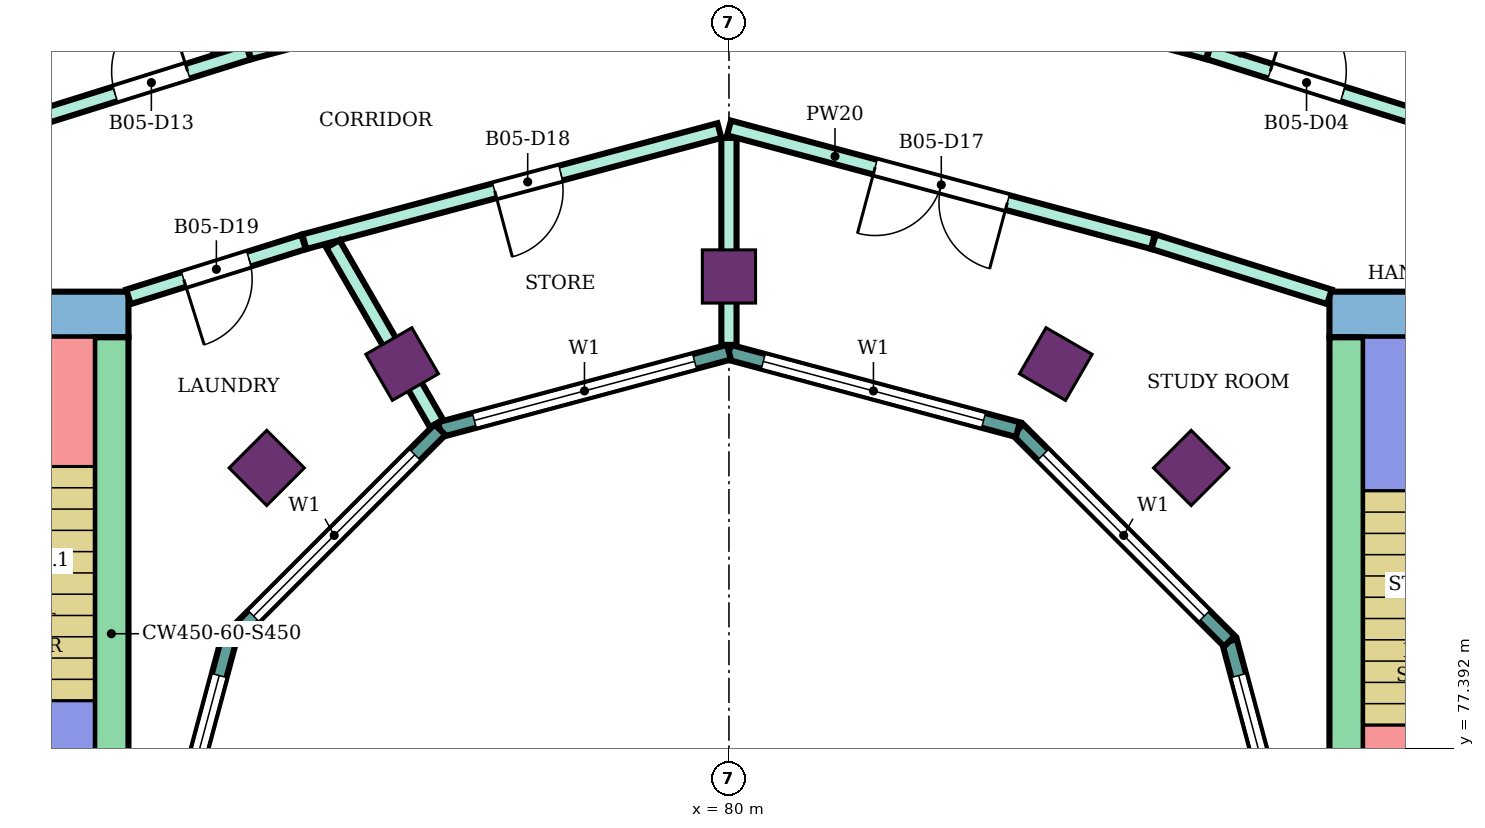
"""IFC4 building model, lengths in metres.
Left out: names, types, materials, properties, quantities, classifications, styles, units other than length and angle.
Written with IfcOpenShell. Run it as: python <this file> out.ifc"""

import sys

from ifc_helpers import new_model, si_unit, direction, frame, frame_2d, origin, origin_2d, place, context, subcontext, project, spatial, rectangle, extrude, element, fill, save


model = new_model("IFC4")
c1 = context("Model", 3, precision=1e-05, world=origin(), true_north=direction((0.0, 1.0)))
c2 = subcontext(c1, "Body", "Model", "MODEL_VIEW")
j1 = project(units=[si_unit("LENGTHUNIT", "METRE"), si_unit("PLANEANGLEUNIT", "RADIAN")], contexts=[c1])
p1 = place(None, origin())
s1 = spatial("IfcSite", under=j1, at=p1, CompositionType="ELEMENT")
p2 = place(p1, origin())
s2 = spatial("IfcBuilding", under=s1, at=p2, CompositionType="ELEMENT")
p3 = place(p2, frame((0.0, 0.0, 266.7)))
s3 = spatial("IfcBuildingStorey", under=s2, at=p3, CompositionType="ELEMENT", Elevation=266.7)
for number, where, z_axis, x_axis in (
    (1, (86.081, 81.081, 0.0), (0.0, 0.0, 1.0), (0.707, 0.707, 0.0)),
    (2, (84.3, 82.448, 0.0), (0.0, 0.0, 1.0), (0.5, 0.866, 0.0)),
    (3, (80.0, 83.6, 0.0), (0.0, 0.0, 1.0), (0.0, 1.0, 0.0)),
    (4, (75.7, 82.448, 0.0), (0.0, 0.0, 1.0), (-0.5, 0.866, 0.0)),
    (5, (73.919, 81.081, 0.0), (0.0, 0.0, 1.0), (-0.707, 0.707, 0.0)),
):
    element("IfcColumn", number, at=place(p3, frame(where, z_axis=z_axis, x_axis=x_axis)), inside=s3, PredefinedType="COLUMN", context=c2, shape_type="SweptSolid", body=[
        extrude(rectangle(XDim=0.7, YDim=0.7, at=origin_2d()), origin(), (0.0, 0.0, 1.0), 4.2),
    ])
p4 = place(p3, frame((87.9, 83.1, 0.0), z_axis=(0.0, 0.0, 1.0), x_axis=(1.0, 0.0, 0.0)))
e6 = element("IfcWall", 6, at=p4, inside=s3, PredefinedType="SHEAR", context=c2, shape_type="SweptSolid", body=[
    extrude(rectangle(XDim=14.9, YDim=0.6, at=frame_2d((7.45, 0.0))), origin(), (0.0, 0.0, 1.0), 3.75),
])
p5 = place(p4, frame((4.2, 0.0, 0.0)))
e7 = element("IfcOpeningElement", 7, at=p5, cuts=e6, PredefinedType="OPENING", context=c2, shape_type="SweptSolid", body=[
    extrude(rectangle(XDim=2.4, YDim=2.4, at=frame_2d((1.2, 1.2))), frame((0.0, 0.31, 0.0), z_axis=(0.0, -1.0, 0.0), x_axis=(1.0, 0.0, 0.0)), (0.0, 0.0, 1.0), 0.62),
])
p6 = place(p3, frame((88.125, 75.0, 0.0), z_axis=(0.0, 0.0, 1.0), x_axis=(0.0, 1.0, 0.0)))
e8 = element("IfcWall", 8, at=p6, inside=s3, PredefinedType="SHEAR", context=c2, shape_type="SweptSolid", body=[
    extrude(rectangle(XDim=7.8, YDim=0.45, at=frame_2d((3.9, 0.0))), origin(), (0.0, 0.0, 1.0), 3.75),
])
p7 = place(p3, frame((72.1, 83.1, 0.0), z_axis=(0.0, 0.0, 1.0), x_axis=(-1.0, 0.0, 0.0)))
e9 = element("IfcWall", 9, at=p7, inside=s3, PredefinedType="SHEAR", context=c2, shape_type="SweptSolid", body=[
    extrude(rectangle(XDim=14.9, YDim=0.6, at=frame_2d((7.45, 0.0))), origin(), (0.0, 0.0, 1.0), 3.75),
])
p8 = place(p7, frame((4.2, 0.0, 0.0)))
e10 = element("IfcOpeningElement", 10, at=p8, cuts=e9, PredefinedType="OPENING", context=c2, shape_type="SweptSolid", body=[
    extrude(rectangle(XDim=2.4, YDim=2.4, at=frame_2d((1.2, 1.2))), frame((0.0, 0.31, 0.0), z_axis=(0.0, -1.0, 0.0), x_axis=(1.0, 0.0, 0.0)), (0.0, 0.0, 1.0), 0.62),
])
p9 = place(p3, frame((71.875, 82.8, 0.0), z_axis=(0.0, 0.0, 1.0), x_axis=(0.0, -1.0, 0.0)))
e11 = element("IfcWall", 11, at=p9, inside=s3, PredefinedType="SHEAR", context=c2, shape_type="SweptSolid", body=[
    extrude(rectangle(XDim=7.8, YDim=0.45, at=frame_2d((3.9, 0.0))), origin(), (0.0, 0.0, 1.0), 3.75),
])
p10 = place(p3, frame((87.604, 75.0, 0.0), z_axis=(0.0, 0.0, 1.0), x_axis=(-0.258789828301, 0.965933654434, 0.0)))
e12 = element("IfcWall", 12, at=p10, inside=s3, PredefinedType="NOTDEFINED", context=c2, shape_type="SweptSolid", body=[
    extrude(rectangle(XDim=3.936, YDim=0.2, at=frame_2d((1.968, 0.0))), origin(), (0.0, 0.0, 1.0), 4.2),
])
p11 = place(p10, frame((0.468, 0.0, 0.9)))
e13 = element("IfcOpeningElement", 13, at=p11, cuts=e12, PredefinedType="OPENING", context=c2, shape_type="SweptSolid", body=[
    extrude(rectangle(XDim=3.0, YDim=2.3, at=frame_2d((1.5, 1.15))), frame((0.0, 0.11, 0.0), z_axis=(0.0, -1.0, 0.0), x_axis=(1.0, 0.0, 0.0)), (0.0, 0.0, 1.0), 0.22),
])
p12 = place(p3, frame((86.585, 78.802, 0.0), z_axis=(0.0, 0.0, 1.0), x_axis=(-0.707106781187, 0.707106781187, 0.0)))
e14 = element("IfcWall", 14, at=p12, inside=s3, PredefinedType="NOTDEFINED", context=c2, shape_type="SweptSolid", body=[
    extrude(rectangle(XDim=3.936, YDim=0.2, at=frame_2d((1.968, 0.0))), origin(), (0.0, 0.0, 1.0), 4.2),
])
p13 = place(p12, frame((0.468, 0.0, 0.9)))
e15 = element("IfcOpeningElement", 15, at=p13, cuts=e14, PredefinedType="OPENING", context=c2, shape_type="SweptSolid", body=[
    extrude(rectangle(XDim=3.0, YDim=2.3, at=frame_2d((1.5, 1.15))), frame((0.0, 0.11, 0.0), z_axis=(0.0, -1.0, 0.0), x_axis=(1.0, 0.0, 0.0)), (0.0, 0.0, 1.0), 0.22),
])
p14 = place(p3, frame((83.802, 81.585, 0.0), z_axis=(0.0, 0.0, 1.0), x_axis=(-0.965933654434, 0.258789828301, 0.0)))
e16 = element("IfcWall", 16, at=p14, inside=s3, PredefinedType="NOTDEFINED", context=c2, shape_type="SweptSolid", body=[
    extrude(rectangle(XDim=3.936, YDim=0.2, at=frame_2d((1.968, 0.0))), origin(), (0.0, 0.0, 1.0), 4.2),
])
p15 = place(p14, frame((0.468, 0.0, 0.9)))
e17 = element("IfcOpeningElement", 17, at=p15, cuts=e16, PredefinedType="OPENING", context=c2, shape_type="SweptSolid", body=[
    extrude(rectangle(XDim=3.0, YDim=2.3, at=frame_2d((1.5, 1.15))), frame((0.0, 0.11, 0.0), z_axis=(0.0, -1.0, 0.0), x_axis=(1.0, 0.0, 0.0)), (0.0, 0.0, 1.0), 0.22),
])
p16 = place(p3, frame((80.0, 82.604, 0.0), z_axis=(0.0, 0.0, 1.0), x_axis=(-0.965933654434, -0.258789828301, 0.0)))
e18 = element("IfcWall", 18, at=p16, inside=s3, PredefinedType="NOTDEFINED", context=c2, shape_type="SweptSolid", body=[
    extrude(rectangle(XDim=3.936, YDim=0.2, at=frame_2d((1.968, 0.0))), origin(), (0.0, 0.0, 1.0), 4.2),
])
p17 = place(p16, frame((0.468, 0.0, 0.9)))
e19 = element("IfcOpeningElement", 19, at=p17, cuts=e18, PredefinedType="OPENING", context=c2, shape_type="SweptSolid", body=[
    extrude(rectangle(XDim=3.0, YDim=2.3, at=frame_2d((1.5, 1.15))), frame((0.0, 0.11, 0.0), z_axis=(0.0, -1.0, 0.0), x_axis=(1.0, 0.0, 0.0)), (0.0, 0.0, 1.0), 0.22),
])
p18 = place(p3, frame((76.198, 81.585, 0.0), z_axis=(0.0, 0.0, 1.0), x_axis=(-0.707106781187, -0.707106781187, 0.0)))
e20 = element("IfcWall", 20, at=p18, inside=s3, PredefinedType="NOTDEFINED", context=c2, shape_type="SweptSolid", body=[
    extrude(rectangle(XDim=3.936, YDim=0.2, at=frame_2d((1.968, 0.0))), origin(), (0.0, 0.0, 1.0), 4.2),
])
p19 = place(p18, frame((0.468, 0.0, 0.9)))
e21 = element("IfcOpeningElement", 21, at=p19, cuts=e20, PredefinedType="OPENING", context=c2, shape_type="SweptSolid", body=[
    extrude(rectangle(XDim=3.0, YDim=2.3, at=frame_2d((1.5, 1.15))), frame((0.0, 0.11, 0.0), z_axis=(0.0, -1.0, 0.0), x_axis=(1.0, 0.0, 0.0)), (0.0, 0.0, 1.0), 0.22),
])
p20 = place(p3, frame((73.415, 78.802, 0.0), z_axis=(0.0, 0.0, 1.0), x_axis=(-0.258789828301, -0.965933654434, 0.0)))
e22 = element("IfcWall", 22, at=p20, inside=s3, PredefinedType="NOTDEFINED", context=c2, shape_type="SweptSolid", body=[
    extrude(rectangle(XDim=3.936, YDim=0.2, at=frame_2d((1.968, 0.0))), origin(), (0.0, 0.0, 1.0), 4.2),
])
p21 = place(p20, frame((0.468, 0.0, 0.9)))
e23 = element("IfcOpeningElement", 23, at=p21, cuts=e22, PredefinedType="OPENING", context=c2, shape_type="SweptSolid", body=[
    extrude(rectangle(XDim=3.0, YDim=2.3, at=frame_2d((1.5, 1.15))), frame((0.0, 0.11, 0.0), z_axis=(0.0, -1.0, 0.0), x_axis=(1.0, 0.0, 0.0)), (0.0, 0.0, 1.0), 0.22),
])
p22 = place(p3, frame((67.104, 97.343, 0.0), z_axis=(0.0, 0.0, 1.0), x_axis=(0.499894524629, -0.866086291455, 0.0)))
e24 = element("IfcWall", 24, at=p22, inside=s3, PredefinedType="PARTITIONING", context=c2, shape_type="SweptSolid", body=[
    extrude(rectangle(XDim=12.446, YDim=0.2, at=frame_2d((6.223, 0.0))), origin(), (0.0, 0.0, 1.0), 3.75),
])
p23 = place(p3, frame((68.2, 84.833, 0.0), z_axis=(0.0, 0.0, 1.0), x_axis=(0.954204109499, 0.299156342762, 0.0)))
e25 = element("IfcWall", 25, at=p23, inside=s3, PredefinedType="PARTITIONING", context=c2, shape_type="SweptSolid", body=[
    extrude(rectangle(XDim=5.74, YDim=0.2, at=frame_2d((2.87, 0.0))), origin(), (0.0, 0.0, 1.0), 3.75),
])
p24 = place(p23, frame((3.903, 0.0, 0.0)))
e26 = element("IfcOpeningElement", 26, at=p24, cuts=e25, PredefinedType="OPENING", context=c2, shape_type="SweptSolid", body=[
    extrude(rectangle(XDim=1.0, YDim=2.1, at=frame_2d((0.5, 1.05))), frame((0.0, 0.11, 0.0), z_axis=(0.0, -1.0, 0.0), x_axis=(1.0, 0.0, 0.0)), (0.0, 0.0, 1.0), 0.22),
])
p25 = place(p3, frame((72.1, 83.332, 0.0), z_axis=(0.0, 0.0, 1.0), x_axis=(0.954233106619, 0.299063836383, 0.0)))
e27 = element("IfcWall", 27, at=p25, inside=s3, PredefinedType="PARTITIONING", context=c2, shape_type="SweptSolid", body=[
    extrude(rectangle(XDim=2.414, YDim=0.2, at=frame_2d((1.207, 0.0))), origin(), (0.0, 0.0, 1.0), 3.75),
])
p26 = place(p25, frame((0.762, 0.0, 0.0)))
e28 = element("IfcOpeningElement", 28, at=p26, cuts=e27, PredefinedType="OPENING", context=c2, shape_type="SweptSolid", body=[
    extrude(rectangle(XDim=0.9, YDim=2.1, at=frame_2d((0.45, 1.05))), frame((0.0, 0.11, 0.0), z_axis=(0.0, -1.0, 0.0), x_axis=(1.0, 0.0, 0.0)), (0.0, 0.0, 1.0), 0.22),
])
p27 = place(p3, frame((73.687, 86.554, 0.0), z_axis=(0.0, 0.0, 1.0), x_axis=(0.965961994098, 0.258684027257, 0.0)))
e29 = element("IfcWall", 29, at=p27, inside=s3, PredefinedType="PARTITIONING", context=c2, shape_type="SweptSolid", body=[
    extrude(rectangle(XDim=6.486, YDim=0.2, at=frame_2d((3.243, 0.0))), origin(), (0.0, 0.0, 1.0), 3.75),
])
p28 = place(p3, frame((74.413, 84.057, 0.0), z_axis=(0.0, 0.0, 1.0), x_axis=(0.965972135939, 0.258646153246, 0.0)))
e30 = element("IfcWall", 30, at=p28, inside=s3, PredefinedType="PARTITIONING", context=c2, shape_type="SweptSolid", body=[
    extrude(rectangle(XDim=5.654, YDim=0.2, at=frame_2d((2.827, 0.0))), origin(), (0.0, 0.0, 1.0), 3.75),
])
p29 = place(p28, frame((2.593, 0.0, 0.0)))
e31 = element("IfcOpeningElement", 31, at=p29, cuts=e30, PredefinedType="OPENING", context=c2, shape_type="SweptSolid", body=[
    extrude(rectangle(XDim=0.9, YDim=2.1, at=frame_2d((0.45, 1.05))), frame((0.0, 0.11, 0.0), z_axis=(0.0, -1.0, 0.0), x_axis=(1.0, 0.0, 0.0)), (0.0, 0.0, 1.0), 0.22),
])
p30 = place(p3, frame((74.789, 84.028, 0.0), z_axis=(0.0, 0.0, 1.0), x_axis=(0.499905962189, -0.866079689733, 0.0)))
e32 = element("IfcWall", 32, at=p30, inside=s3, PredefinedType="PARTITIONING", context=c2, shape_type="SweptSolid", body=[
    extrude(rectangle(XDim=2.726, YDim=0.2, at=frame_2d((1.363, 0.0))), origin(), (0.0, 0.0, 1.0), 3.75),
])
p31 = place(p3, frame((80.0, 82.7, 0.0), z_axis=(0.0, 0.0, 1.0), x_axis=(0.0, 1.0, 0.0)))
e33 = element("IfcWall", 33, at=p31, inside=s3, PredefinedType="PARTITIONING", context=c2, shape_type="SweptSolid", body=[
    extrude(rectangle(XDim=2.723, YDim=0.2, at=frame_2d((1.362, 0.0))), origin(), (0.0, 0.0, 1.0), 3.75),
])
p32 = place(p3, frame((80.048, 88.233, 0.0), z_axis=(0.0, 0.0, 1.0), x_axis=(0.965867917069, -0.259035068625, 0.0)))
e34 = element("IfcWall", 34, at=p32, inside=s3, PredefinedType="PARTITIONING", context=c2, shape_type="SweptSolid", body=[
    extrude(rectangle(XDim=6.476, YDim=0.2, at=frame_2d((3.238, 0.0))), origin(), (0.0, 0.0, 1.0), 3.75),
])
p33 = place(p32, frame((0.5, 0.0, 0.0)))
e35 = element("IfcOpeningElement", 35, at=p33, cuts=e34, PredefinedType="OPENING", context=c2, shape_type="SweptSolid", body=[
    extrude(rectangle(XDim=1.0, YDim=2.1, at=frame_2d((0.5, 1.05))), frame((0.0, 0.11, 0.0), z_axis=(0.0, -1.0, 0.0), x_axis=(1.0, 0.0, 0.0)), (0.0, 0.0, 1.0), 0.22),
])
p34 = place(p3, frame((80.001, 85.554, 0.0), z_axis=(0.0, 0.0, 1.0), x_axis=(0.965917658836, -0.258849524528, 0.0)))
e36 = element("IfcWall", 36, at=p34, inside=s3, PredefinedType="PARTITIONING", context=c2, shape_type="SweptSolid", body=[
    extrude(rectangle(XDim=5.773, YDim=0.2, at=frame_2d((2.887, 0.0))), origin(), (0.0, 0.0, 1.0), 3.75),
])
p35 = place(p34, frame((1.991, 0.0, 0.0)))
e37 = element("IfcOpeningElement", 37, at=p35, cuts=e36, PredefinedType="OPENING", context=c2, shape_type="SweptSolid", body=[
    extrude(rectangle(XDim=1.8, YDim=2.1, at=frame_2d((0.9, 1.05))), frame((0.0, 0.11, 0.0), z_axis=(0.0, -1.0, 0.0), x_axis=(1.0, 0.0, 0.0)), (0.0, 0.0, 1.0), 0.22),
])
p36 = place(p3, frame((85.587, 84.057, 0.0), z_axis=(0.0, 0.0, 1.0), x_axis=(0.954210767728, -0.299135104513, 0.0)))
e38 = element("IfcWall", 38, at=p36, inside=s3, PredefinedType="PARTITIONING", context=c2, shape_type="SweptSolid", body=[
    extrude(rectangle(XDim=2.424, YDim=0.2, at=frame_2d((1.212, 0.0))), origin(), (0.0, 0.0, 1.0), 3.75),
])
p37 = place(p3, frame((86.313, 86.554, 0.0), z_axis=(0.0, 0.0, 1.0), x_axis=(0.954081217458, -0.299548043717, 0.0)))
e39 = element("IfcWall", 39, at=p37, inside=s3, PredefinedType="PARTITIONING", context=c2, shape_type="SweptSolid", body=[
    extrude(rectangle(XDim=5.721, YDim=0.2, at=frame_2d((2.86, 0.0))), origin(), (0.0, 0.0, 1.0), 3.75),
])
p38 = place(p37, frame((0.848, 0.0, 0.0)))
e40 = element("IfcOpeningElement", 40, at=p38, cuts=e39, PredefinedType="OPENING", context=c2, shape_type="SweptSolid", body=[
    extrude(rectangle(XDim=1.0, YDim=2.1, at=frame_2d((0.5, 1.05))), frame((0.0, 0.11, 0.0), z_axis=(0.0, -1.0, 0.0), x_axis=(1.0, 0.0, 0.0)), (0.0, 0.0, 1.0), 0.22),
])
p39 = place(p3, frame((86.671, 86.554, 0.0), z_axis=(0.0, 0.0, 1.0), x_axis=(0.500005228967, 0.866022384818, 0.0)))
e41 = element("IfcWall", 41, at=p39, inside=s3, PredefinedType="PARTITIONING", context=c2, shape_type="SweptSolid", body=[
    extrude(rectangle(XDim=12.456, YDim=0.1, at=frame_2d((6.228, 0.0))), origin(), (0.0, 0.0, 1.0), 3.75),
])
p40 = place(p39, frame((7.196, 0.0, 0.0)))
e42 = element("IfcOpeningElement", 42, at=p40, cuts=e41, PredefinedType="OPENING", context=c2, shape_type="SweptSolid", body=[
    extrude(rectangle(XDim=0.9, YDim=2.1, at=frame_2d((0.45, 1.05))), frame((0.0, 0.06, 0.0), z_axis=(0.0, -1.0, 0.0), x_axis=(1.0, 0.0, 0.0)), (0.0, 0.0, 1.0), 0.12),
])
p41 = place(p11, origin())
e43 = element("IfcWindow", 43, at=p41, inside=s3, PartitioningType="SINGLE_PANEL", PredefinedType="WINDOW", context=c2, shape_type="SweptSolid", body=[
    extrude(rectangle(XDim=3.0, YDim=2.3, at=frame_2d((1.5, 1.15))), frame((0.0, 0.03, 0.0), z_axis=(0.0, -1.0, 0.0), x_axis=(1.0, 0.0, 0.0)), (0.0, 0.0, 1.0), 0.06),
])
fill(e13, e43)
p42 = place(p13, origin())
e44 = element("IfcWindow", 44, at=p42, inside=s3, PartitioningType="SINGLE_PANEL", PredefinedType="WINDOW", context=c2, shape_type="SweptSolid", body=[
    extrude(rectangle(XDim=3.0, YDim=2.3, at=frame_2d((1.5, 1.15))), frame((0.0, 0.03, 0.0), z_axis=(0.0, -1.0, 0.0), x_axis=(1.0, 0.0, 0.0)), (0.0, 0.0, 1.0), 0.06),
])
fill(e15, e44)
p43 = place(p15, origin())
e45 = element("IfcWindow", 45, at=p43, inside=s3, PartitioningType="SINGLE_PANEL", PredefinedType="WINDOW", context=c2, shape_type="SweptSolid", body=[
    extrude(rectangle(XDim=3.0, YDim=2.3, at=frame_2d((1.5, 1.15))), frame((0.0, 0.03, 0.0), z_axis=(0.0, -1.0, 0.0), x_axis=(1.0, 0.0, 0.0)), (0.0, 0.0, 1.0), 0.06),
])
fill(e17, e45)
p44 = place(p17, origin())
e46 = element("IfcWindow", 46, at=p44, inside=s3, PartitioningType="SINGLE_PANEL", PredefinedType="WINDOW", context=c2, shape_type="SweptSolid", body=[
    extrude(rectangle(XDim=3.0, YDim=2.3, at=frame_2d((1.5, 1.15))), frame((0.0, 0.03, 0.0), z_axis=(0.0, -1.0, 0.0), x_axis=(1.0, 0.0, 0.0)), (0.0, 0.0, 1.0), 0.06),
])
fill(e19, e46)
p45 = place(p19, origin())
e47 = element("IfcWindow", 47, at=p45, inside=s3, PartitioningType="SINGLE_PANEL", PredefinedType="WINDOW", context=c2, shape_type="SweptSolid", body=[
    extrude(rectangle(XDim=3.0, YDim=2.3, at=frame_2d((1.5, 1.15))), frame((0.0, 0.03, 0.0), z_axis=(0.0, -1.0, 0.0), x_axis=(1.0, 0.0, 0.0)), (0.0, 0.0, 1.0), 0.06),
])
fill(e21, e47)
p46 = place(p21, origin())
e48 = element("IfcWindow", 48, at=p46, inside=s3, PartitioningType="SINGLE_PANEL", PredefinedType="WINDOW", context=c2, shape_type="SweptSolid", body=[
    extrude(rectangle(XDim=3.0, YDim=2.3, at=frame_2d((1.5, 1.15))), frame((0.0, 0.03, 0.0), z_axis=(0.0, -1.0, 0.0), x_axis=(1.0, 0.0, 0.0)), (0.0, 0.0, 1.0), 0.06),
])
fill(e23, e48)
p47 = place(p38, origin())
e49 = element("IfcDoor", 49, at=p47, inside=s3, OperationType="SINGLE_SWING_LEFT", PredefinedType="DOOR", context=c2, shape_type="SweptSolid", body=[
    extrude(rectangle(XDim=1.0, YDim=2.1, at=frame_2d((0.5, 1.05))), frame((0.0, 0.025, 0.0), z_axis=(0.0, -1.0, 0.0), x_axis=(1.0, 0.0, 0.0)), (0.0, 0.0, 1.0), 0.05),
])
fill(e40, e49)
p48 = place(p24, origin())
e50 = element("IfcDoor", 50, at=p48, inside=s3, OperationType="SINGLE_SWING_RIGHT", PredefinedType="DOOR", context=c2, shape_type="SweptSolid", body=[
    extrude(rectangle(XDim=1.0, YDim=2.1, at=frame_2d((0.5, 1.05))), frame((0.0, 0.025, 0.0), z_axis=(0.0, -1.0, 0.0), x_axis=(1.0, 0.0, 0.0)), (0.0, 0.0, 1.0), 0.05),
])
fill(e26, e50)
p49 = place(p35, frame((1.8, 0.0, 0.0), z_axis=(0.0, 0.0, 1.0), x_axis=(-1.0, 0.0, 0.0)))
e51 = element("IfcDoor", 51, at=p49, inside=s3, OperationType="DOUBLE_DOOR_SINGLE_SWING", PredefinedType="DOOR", context=c2, shape_type="SweptSolid", body=[
    extrude(rectangle(XDim=1.8, YDim=2.1, at=frame_2d((0.9, 1.05))), frame((0.0, 0.025, 0.0), z_axis=(0.0, -1.0, 0.0), x_axis=(1.0, 0.0, 0.0)), (0.0, 0.0, 1.0), 0.05),
])
fill(e37, e51)
p50 = place(p29, frame((0.9, 0.0, 0.0), z_axis=(0.0, 0.0, 1.0), x_axis=(-1.0, 0.0, 0.0)))
e52 = element("IfcDoor", 52, at=p50, inside=s3, OperationType="SINGLE_SWING_RIGHT", PredefinedType="DOOR", context=c2, shape_type="SweptSolid", body=[
    extrude(rectangle(XDim=0.9, YDim=2.1, at=frame_2d((0.45, 1.05))), frame((0.0, 0.025, 0.0), z_axis=(0.0, -1.0, 0.0), x_axis=(1.0, 0.0, 0.0)), (0.0, 0.0, 1.0), 0.05),
])
fill(e31, e52)
p51 = place(p26, frame((0.9, 0.0, 0.0), z_axis=(0.0, 0.0, 1.0), x_axis=(-1.0, 0.0, 0.0)))
e53 = element("IfcDoor", 53, at=p51, inside=s3, OperationType="SINGLE_SWING_RIGHT", PredefinedType="DOOR", context=c2, shape_type="SweptSolid", body=[
    extrude(rectangle(XDim=0.9, YDim=2.1, at=frame_2d((0.45, 1.05))), frame((0.0, 0.025, 0.0), z_axis=(0.0, -1.0, 0.0), x_axis=(1.0, 0.0, 0.0)), (0.0, 0.0, 1.0), 0.05),
])
fill(e28, e53)
save(model, sys.argv[1])
